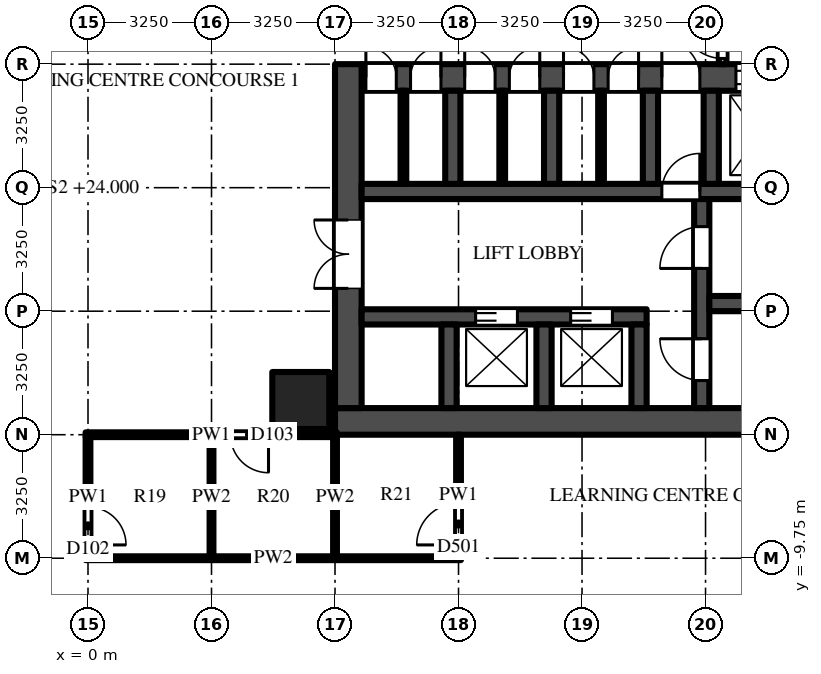
"""IFC4 building model, lengths in metres.
Left out: names, types, materials, properties, quantities, classifications, styles, units other than length and angle.
Written with IfcOpenShell. Run it as: python <this file> out.ifc"""

import sys

from ifc_helpers import new_model, si_unit, direction, frame, frame_2d, origin, origin_2d, place, context, subcontext, project, spatial, rectangle, extrude, source, transform, mapped, element, fill, save


model = new_model("IFC4")
c1 = context("Model", 3, precision=1e-05, world=origin(), true_north=direction((0.0, 1.0)))
c2 = subcontext(c1, "Body", "Model", "MODEL_VIEW")
j1 = project(units=[si_unit("LENGTHUNIT", "METRE"), si_unit("PLANEANGLEUNIT", "RADIAN")], contexts=[c1])
p1 = place(None, origin())
s1 = spatial("IfcSite", under=j1, at=p1, CompositionType="ELEMENT")
p2 = place(p1, origin())
s2 = spatial("IfcBuilding", under=s1, at=p2, CompositionType="ELEMENT")
p3 = place(p2, frame((0.0, 0.0, 24.0)))
s3 = spatial("IfcBuildingStorey", under=s2, at=p3, CompositionType="ELEMENT", Elevation=24.0)
m1 = source(origin(), c2, "Body", "SweptSolid", [
    extrude(rectangle(XDim=1.5, YDim=1.5, at=origin_2d()), origin(), (0.0, 0.0, 1.0), 5.0),
])
p4 = place(p3, frame((5.6, -5.6, 0.0), z_axis=(0.0, 0.0, 1.0), x_axis=(1.0, 0.0, 0.0)))
e1 = element("IfcColumn", 1, at=p4, inside=s3, PredefinedType="COLUMN", context=c2, shape_type="MappedRepresentation", body=[
    mapped(m1, transform((0.0, 0.0, 0.0))),
])
m2 = source(origin(), c2, "Body", "SweptSolid", [
    extrude(rectangle(XDim=16.25, YDim=0.7, at=frame_2d((8.125, 0.0))), origin(), (0.0, 0.0, 1.0), 4.7),
])
p5 = place(p3, frame((6.5, -6.15, 0.0), z_axis=(0.0, 0.0, 1.0), x_axis=(1.0, 0.0, 0.0)))
e2 = element("IfcWall", 2, at=p5, inside=s3, PredefinedType="SHEAR", context=c2, shape_type="MappedRepresentation", body=[
    mapped(m2, transform((0.0, 0.0, 0.0))),
])
m3 = source(origin(), c2, "Body", "SweptSolid", [
    extrude(rectangle(XDim=14.85, YDim=0.7, at=frame_2d((7.425, 0.0))), origin(), (0.0, 0.0, 1.0), 4.7),
])
p6 = place(p3, frame((7.2, 2.9, 0.0), z_axis=(0.0, 0.0, 1.0), x_axis=(1.0, 0.0, 0.0)))
e3 = element("IfcWall", 3, at=p6, inside=s3, PredefinedType="SHEAR", context=c2, shape_type="MappedRepresentation", body=[
    mapped(m3, transform((0.0, 0.0, 0.0))),
])
m4 = source(origin(), c2, "Body", "SweptSolid", [
    extrude(rectangle(XDim=1.3, YDim=2.1, at=frame_2d((0.65, 1.05))), frame((0.0, 0.36, 0.0), z_axis=(0.0, -1.0, 0.0), x_axis=(1.0, 0.0, 0.0)), (0.0, 0.0, 1.0), 0.72),
])
p7 = place(p6, frame((12.2, 0.0, 0.0)))
e4 = element("IfcOpeningElement", 4, at=p7, cuts=e3, PredefinedType="OPENING", context=c2, shape_type="MappedRepresentation", body=[
    mapped(m4, transform((0.0, 0.0, 0.0))),
])
m5 = source(origin(), c2, "Body", "SweptSolid", [
    extrude(rectangle(XDim=1.2, YDim=2.1, at=frame_2d((0.6, 1.05))), frame((0.0, 0.36, 0.0), z_axis=(0.0, -1.0, 0.0), x_axis=(1.0, 0.0, 0.0)), (0.0, 0.0, 1.0), 0.72),
])
p8 = place(p6, frame((9.85, 0.0, 0.0)))
e5 = element("IfcOpeningElement", 5, at=p8, cuts=e3, PredefinedType="OPENING", context=c2, shape_type="MappedRepresentation", body=[
    mapped(m5, transform((0.0, 0.0, 0.0))),
])
m6 = source(origin(), c2, "Body", "SweptSolid", [
    extrude(rectangle(XDim=1.0, YDim=2.1, at=frame_2d((0.5, 1.05))), frame((0.0, 0.36, 0.0), z_axis=(0.0, -1.0, 0.0), x_axis=(1.0, 0.0, 0.0)), (0.0, 0.0, 1.0), 0.72),
])
p9 = place(p6, frame((7.9, 0.0, 0.0)))
e6 = element("IfcOpeningElement", 6, at=p9, cuts=e3, PredefinedType="OPENING", context=c2, shape_type="MappedRepresentation", body=[
    mapped(m6, transform((0.0, 0.0, 0.0))),
])
m7 = source(origin(), c2, "Body", "SweptSolid", [
    extrude(rectangle(XDim=0.8, YDim=2.1, at=frame_2d((0.4, 1.05))), frame((0.0, 0.36, 0.0), z_axis=(0.0, -1.0, 0.0), x_axis=(1.0, 0.0, 0.0)), (0.0, 0.0, 1.0), 0.72),
])
p10 = place(p6, frame((0.113, 0.0, 0.0)))
e7 = element("IfcOpeningElement", 7, at=p10, cuts=e3, PredefinedType="OPENING", context=c2, shape_type="MappedRepresentation", body=[
    mapped(m7, transform((0.0, 0.0, 0.0))),
])
p11 = place(p6, frame((1.288, 0.0, 0.0)))
e8 = element("IfcOpeningElement", 8, at=p11, cuts=e3, PredefinedType="OPENING", context=c2, shape_type="MappedRepresentation", body=[
    mapped(m7, transform((0.0, 0.0, 0.0))),
])
p12 = place(p6, frame((2.712, 0.0, 0.0)))
e9 = element("IfcOpeningElement", 9, at=p12, cuts=e3, PredefinedType="OPENING", context=c2, shape_type="MappedRepresentation", body=[
    mapped(m7, transform((0.0, 0.0, 0.0))),
])
p13 = place(p6, frame((3.887, 0.0, 0.0)))
e10 = element("IfcOpeningElement", 10, at=p13, cuts=e3, PredefinedType="OPENING", context=c2, shape_type="MappedRepresentation", body=[
    mapped(m7, transform((0.0, 0.0, 0.0))),
])
p14 = place(p6, frame((5.312, 0.0, 0.0)))
e11 = element("IfcOpeningElement", 11, at=p14, cuts=e3, PredefinedType="OPENING", context=c2, shape_type="MappedRepresentation", body=[
    mapped(m7, transform((0.0, 0.0, 0.0))),
])
p15 = place(p6, frame((6.488, 0.0, 0.0)))
e12 = element("IfcOpeningElement", 12, at=p15, cuts=e3, PredefinedType="OPENING", context=c2, shape_type="MappedRepresentation", body=[
    mapped(m7, transform((0.0, 0.0, 0.0))),
])
m8 = source(origin(), c2, "Body", "SweptSolid", [
    extrude(rectangle(XDim=9.05, YDim=0.7, at=frame_2d((4.525, 0.0))), origin(), (0.0, 0.0, 1.0), 4.7),
])
p16 = place(p3, frame((6.85, -5.8, 0.0), z_axis=(0.0, 0.0, 1.0), x_axis=(0.0, 1.0, 0.0)))
e13 = element("IfcWall", 13, at=p16, inside=s3, PredefinedType="SHEAR", context=c2, shape_type="MappedRepresentation", body=[
    mapped(m8, transform((0.0, 0.0, 0.0))),
])
m9 = source(origin(), c2, "Body", "SweptSolid", [
    extrude(rectangle(XDim=1.8, YDim=2.1, at=frame_2d((0.9, 1.05))), frame((0.0, 0.36, 0.0), z_axis=(0.0, -1.0, 0.0), x_axis=(1.0, 0.0, 0.0)), (0.0, 0.0, 1.0), 0.72),
])
p17 = place(p16, frame((3.15, 0.0, 0.0)))
e14 = element("IfcOpeningElement", 14, at=p17, cuts=e13, PredefinedType="OPENING", context=c2, shape_type="MappedRepresentation", body=[
    mapped(m9, transform((0.0, 0.0, 0.0))),
])
m10 = source(origin(), c2, "Body", "SweptSolid", [
    extrude(rectangle(XDim=7.5, YDim=0.4, at=frame_2d((3.75, 0.0))), origin(), (0.0, 0.0, 1.0), 4.7),
])
p18 = place(p3, frame((7.2, -3.4, 0.0), z_axis=(0.0, 0.0, 1.0), x_axis=(1.0, 0.0, 0.0)))
e15 = element("IfcWall", 15, at=p18, inside=s3, PredefinedType="SHEAR", context=c2, shape_type="MappedRepresentation", body=[
    mapped(m10, transform((0.0, 0.0, 0.0))),
])
m11 = source(origin(), c2, "Body", "SweptSolid", [
    extrude(rectangle(XDim=1.1, YDim=2.1, at=frame_2d((0.55, 1.05))), frame((0.0, 0.21, 0.0), z_axis=(0.0, -1.0, 0.0), x_axis=(1.0, 0.0, 0.0)), (0.0, 0.0, 1.0), 0.42),
])
p19 = place(p18, frame((3.0, 0.0, 0.0)))
e16 = element("IfcOpeningElement", 16, at=p19, cuts=e15, PredefinedType="OPENING", context=c2, shape_type="MappedRepresentation", body=[
    mapped(m11, transform((0.0, 0.0, 0.0))),
])
p20 = place(p18, frame((5.5, 0.0, 0.0)))
e17 = element("IfcOpeningElement", 17, at=p20, cuts=e15, PredefinedType="OPENING", context=c2, shape_type="MappedRepresentation", body=[
    mapped(m11, transform((0.0, 0.0, 0.0))),
])
m12 = source(origin(), c2, "Body", "SweptSolid", [
    extrude(rectangle(XDim=14.85, YDim=0.4, at=frame_2d((7.425, 0.0))), origin(), (0.0, 0.0, 1.0), 4.7),
])
p21 = place(p3, frame((7.2, -0.1, 0.0), z_axis=(0.0, 0.0, 1.0), x_axis=(1.0, 0.0, 0.0)))
e18 = element("IfcWall", 18, at=p21, inside=s3, PredefinedType="SHEAR", context=c2, shape_type="MappedRepresentation", body=[
    mapped(m12, transform((0.0, 0.0, 0.0))),
])
m13 = source(origin(), c2, "Body", "SweptSolid", [
    extrude(rectangle(XDim=1.0, YDim=2.1, at=frame_2d((0.5, 1.05))), frame((0.0, 0.21, 0.0), z_axis=(0.0, -1.0, 0.0), x_axis=(1.0, 0.0, 0.0)), (0.0, 0.0, 1.0), 0.42),
])
p22 = place(p21, frame((7.9, 0.0, 0.0)))
e19 = element("IfcOpeningElement", 19, at=p22, cuts=e18, PredefinedType="OPENING", context=c2, shape_type="MappedRepresentation", body=[
    mapped(m13, transform((0.0, 0.0, 0.0))),
])
m14 = source(origin(), c2, "Body", "SweptSolid", [
    extrude(rectangle(XDim=5.5, YDim=0.4, at=frame_2d((2.75, 0.0))), origin(), (0.0, 0.0, 1.0), 4.7),
])
p23 = place(p3, frame((16.15, -5.8, 0.0), z_axis=(0.0, 0.0, 1.0), x_axis=(0.0, 1.0, 0.0)))
e20 = element("IfcWall", 20, at=p23, inside=s3, PredefinedType="SHEAR", context=c2, shape_type="MappedRepresentation", body=[
    mapped(m14, transform((0.0, 0.0, 0.0))),
])
p24 = place(p23, frame((0.725, 0.0, 0.0)))
e21 = element("IfcOpeningElement", 21, at=p24, cuts=e20, PredefinedType="OPENING", context=c2, shape_type="MappedRepresentation", body=[
    mapped(m11, transform((0.0, 0.0, 0.0))),
])
p25 = place(p23, frame((3.675, 0.0, 0.0)))
e22 = element("IfcOpeningElement", 22, at=p25, cuts=e20, PredefinedType="OPENING", context=c2, shape_type="MappedRepresentation", body=[
    mapped(m11, transform((0.0, 0.0, 0.0))),
])
m15 = source(origin(), c2, "Body", "SweptSolid", [
    extrude(rectangle(XDim=5.7, YDim=0.4, at=frame_2d((2.85, 0.0))), origin(), (0.0, 0.0, 1.0), 4.7),
])
p26 = place(p3, frame((16.35, -3.05, 0.0), z_axis=(0.0, 0.0, 1.0), x_axis=(1.0, 0.0, 0.0)))
e23 = element("IfcWall", 23, at=p26, inside=s3, PredefinedType="SHEAR", context=c2, shape_type="MappedRepresentation", body=[
    mapped(m15, transform((0.0, 0.0, 0.0))),
])
m16 = source(origin(), c2, "Body", "SweptSolid", [
    extrude(rectangle(XDim=2.2, YDim=0.4, at=frame_2d((1.1, 0.0))), origin(), (0.0, 0.0, 1.0), 4.7),
])
for number, where, z_axis, x_axis in (
    (24, (9.5, -5.8, 0.0), (0.0, 0.0, 1.0), (0.0, 1.0, 0.0)),
    (25, (12.0, -5.8, 0.0), (0.0, 0.0, 1.0), (0.0, 1.0, 0.0)),
    (26, (14.5, -5.8, 0.0), (0.0, 0.0, 1.0), (0.0, 1.0, 0.0)),
):
    element("IfcWall", number, at=place(p3, frame(where, z_axis=z_axis, x_axis=x_axis)), inside=s3, PredefinedType="SHEAR", context=c2, shape_type="MappedRepresentation", body=[
        mapped(m16, transform((0.0, 0.0, 0.0))),
    ])
m17 = source(origin(), c2, "Body", "SweptSolid", [
    extrude(rectangle(XDim=2.45, YDim=0.4, at=frame_2d((1.225, 0.0))), origin(), (0.0, 0.0, 1.0), 4.7),
])
for number, where, z_axis, x_axis in (
    (27, (9.6, 0.1, 0.0), (0.0, 0.0, 1.0), (0.0, 1.0, 0.0)),
    (28, (12.2, 0.1, 0.0), (0.0, 0.0, 1.0), (0.0, 1.0, 0.0)),
    (29, (14.8, 0.1, 0.0), (0.0, 0.0, 1.0), (0.0, 1.0, 0.0)),
    (30, (16.4, 0.1, 0.0), (0.0, 0.0, 1.0), (0.0, 1.0, 0.0)),
):
    element("IfcWall", number, at=place(p3, frame(where, z_axis=z_axis, x_axis=x_axis)), inside=s3, PredefinedType="SHEAR", context=c2, shape_type="MappedRepresentation", body=[
        mapped(m17, transform((0.0, 0.0, 0.0))),
    ])
m18 = source(origin(), c2, "Body", "SweptSolid", [
    extrude(rectangle(XDim=3.25, YDim=0.2, at=frame_2d((1.625, 0.0))), origin(), (0.0, 0.0, 1.0), 4.7),
])
p27 = place(p3, frame((16.7, 3.25, 0.0), z_axis=(0.0, 0.0, 1.0), x_axis=(0.0, 1.0, 0.0)))
e31 = element("IfcWall", 31, at=p27, inside=s3, PredefinedType="PARTITIONING", context=c2, shape_type="MappedRepresentation", body=[
    mapped(m18, transform((0.0, 0.0, 0.0))),
])
m19 = source(origin(), c2, "Body", "SweptSolid", [
    extrude(rectangle(XDim=1.1, YDim=2.1, at=frame_2d((0.55, 1.05))), frame((0.0, 0.11, 0.0), z_axis=(0.0, -1.0, 0.0), x_axis=(1.0, 0.0, 0.0)), (0.0, 0.0, 1.0), 0.22),
])
p28 = place(p27, frame((0.15, 0.0, 0.0)))
e32 = element("IfcOpeningElement", 32, at=p28, cuts=e31, PredefinedType="OPENING", context=c2, shape_type="MappedRepresentation", body=[
    mapped(m19, transform((0.0, 0.0, 0.0))),
])
m20 = source(origin(), c2, "Body", "SweptSolid", [
    extrude(rectangle(XDim=2.45, YDim=0.15, at=frame_2d((1.225, 0.0))), origin(), (0.0, 0.0, 1.0), 4.7),
])
for number, where, z_axis, x_axis in (
    (33, (8.3, 0.1, 0.0), (0.0, 0.0, 1.0), (0.0, 1.0, 0.0)),
    (34, (10.9, 0.1, 0.0), (0.0, 0.0, 1.0), (0.0, 1.0, 0.0)),
    (35, (13.5, 0.1, 0.0), (0.0, 0.0, 1.0), (0.0, 1.0, 0.0)),
):
    element("IfcWall", number, at=place(p3, frame(where, z_axis=z_axis, x_axis=x_axis)), inside=s3, PredefinedType="PARTITIONING", context=c2, shape_type="MappedRepresentation", body=[
        mapped(m20, transform((0.0, 0.0, 0.0))),
    ])
m21 = source(origin(), c2, "Body", "SweptSolid", [
    extrude(rectangle(XDim=3.137, YDim=0.125, at=frame_2d((1.569, 0.0))), origin(), (0.0, 0.0, 1.0), 4.077),
])
p29 = place(p3, frame((0.0, -6.562, 0.0), z_axis=(0.0, 0.0, 1.0), x_axis=(0.0, -1.0, 0.0)))
e36 = element("IfcWall", 36, at=p29, inside=s3, PredefinedType="PARTITIONING", context=c2, shape_type="MappedRepresentation", body=[
    mapped(m21, transform((0.0, 0.0, 0.0))),
])
m22 = source(origin(), c2, "Body", "SweptSolid", [
    extrude(rectangle(XDim=1.0, YDim=2.1, at=frame_2d((0.5, 1.05))), frame((0.0, 0.073, 0.0), z_axis=(0.0, -1.0, 0.0), x_axis=(1.0, 0.0, 0.0)), (0.0, 0.0, 1.0), 0.145),
])
p30 = place(p29, frame((1.837, 0.0, 0.0)))
e37 = element("IfcOpeningElement", 37, at=p30, cuts=e36, PredefinedType="OPENING", context=c2, shape_type="MappedRepresentation", body=[
    mapped(m22, transform((0.0, 0.0, 0.0))),
])
m23 = source(origin(), c2, "Body", "SweptSolid", [
    extrude(rectangle(XDim=3.137, YDim=0.1, at=frame_2d((1.569, 0.0))), origin(), (0.0, 0.0, 1.0), 4.7),
])
p31 = place(p3, frame((3.25, -9.7, 0.0), z_axis=(0.0, 0.0, 1.0), x_axis=(0.0, 1.0, 0.0)))
e38 = element("IfcWall", 38, at=p31, inside=s3, PredefinedType="PARTITIONING", context=c2, shape_type="MappedRepresentation", body=[
    mapped(m23, transform((0.0, 0.0, 0.0))),
])
m24 = source(origin(), c2, "Body", "SweptSolid", [
    extrude(rectangle(XDim=3.137, YDim=0.1, at=frame_2d((1.569, 0.0))), origin(), (0.0, 0.0, 1.0), 3.996),
])
p32 = place(p3, frame((6.5, -9.7, 0.0), z_axis=(0.0, 0.0, 1.0), x_axis=(0.0, 1.0, 0.0)))
e39 = element("IfcWall", 39, at=p32, inside=s3, PredefinedType="PARTITIONING", context=c2, shape_type="MappedRepresentation", body=[
    mapped(m24, transform((0.0, 0.0, 0.0))),
])
m25 = source(origin(), c2, "Body", "SweptSolid", [
    extrude(rectangle(XDim=3.2, YDim=0.125, at=frame_2d((1.6, 0.0))), origin(), (0.0, 0.0, 1.0), 3.996),
])
p33 = place(p3, frame((9.75, -9.7, 0.0), z_axis=(0.0, 0.0, 1.0), x_axis=(0.0, 1.0, 0.0)))
e40 = element("IfcWall", 40, at=p33, inside=s3, PredefinedType="PARTITIONING", context=c2, shape_type="MappedRepresentation", body=[
    mapped(m25, transform((0.0, 0.0, 0.0))),
])
m26 = source(origin(), c2, "Body", "SweptSolid", [
    extrude(rectangle(XDim=1.1, YDim=2.1, at=frame_2d((0.55, 1.05))), frame((0.0, 0.073, 0.0), z_axis=(0.0, -1.0, 0.0), x_axis=(1.0, 0.0, 0.0)), (0.0, 0.0, 1.0), 0.145),
])
p34 = place(p33, frame((0.3, 0.0, 0.0)))
e41 = element("IfcOpeningElement", 41, at=p34, cuts=e40, PredefinedType="OPENING", context=c2, shape_type="MappedRepresentation", body=[
    mapped(m26, transform((0.0, 0.0, 0.0))),
])
m27 = source(origin(), c2, "Body", "SweptSolid", [
    extrude(rectangle(XDim=9.875, YDim=0.1, at=frame_2d((4.938, 0.0))), origin(), (0.0, 0.0, 1.0), 3.762),
])
p35 = place(p3, frame((-0.062, -9.75, 0.0), z_axis=(0.0, 0.0, 1.0), x_axis=(1.0, 0.0, 0.0)))
e42 = element("IfcWall", 42, at=p35, inside=s3, PredefinedType="PARTITIONING", context=c2, shape_type="MappedRepresentation", body=[
    mapped(m27, transform((0.0, 0.0, 0.0))),
])
m28 = source(origin(), c2, "Body", "SweptSolid", [
    extrude(rectangle(XDim=6.613, YDim=0.125, at=frame_2d((3.306, 0.0))), origin(), (0.0, 0.0, 1.0), 3.762),
])
p36 = place(p3, frame((6.55, -6.5, 0.0), z_axis=(0.0, 0.0, 1.0), x_axis=(-1.0, 0.0, 0.0)))
e43 = element("IfcWall", 43, at=p36, inside=s3, PredefinedType="PARTITIONING", context=c2, shape_type="MappedRepresentation", body=[
    mapped(m28, transform((0.0, 0.0, 0.0))),
])
p37 = place(p36, frame((1.8, 0.0, 0.0)))
e44 = element("IfcOpeningElement", 44, at=p37, cuts=e43, PredefinedType="OPENING", context=c2, shape_type="MappedRepresentation", body=[
    mapped(m22, transform((0.0, 0.0, 0.0))),
])
m29 = source(origin(), c2, "Body", "SweptSolid", [
    extrude(rectangle(XDim=1.1, YDim=2.1, at=frame_2d((0.55, 1.05))), frame((0.0, 0.025, 0.0), z_axis=(0.0, -1.0, 0.0), x_axis=(1.0, 0.0, 0.0)), (0.0, 0.0, 1.0), 0.05),
])
p38 = place(p19, origin())
e45 = element("IfcDoor", 45, at=p38, inside=s3, OperationType="DOUBLE_DOOR_SLIDING", PredefinedType="DOOR", context=c2, shape_type="MappedRepresentation", body=[
    mapped(m29, transform((0.0, 0.0, 0.0))),
])
fill(e16, e45)
p39 = place(p20, origin())
e46 = element("IfcDoor", 46, at=p39, inside=s3, OperationType="DOUBLE_DOOR_SLIDING", PredefinedType="DOOR", context=c2, shape_type="MappedRepresentation", body=[
    mapped(m29, transform((0.0, 0.0, 0.0))),
])
fill(e17, e46)
m30 = source(origin(), c2, "Body", "SweptSolid", [
    extrude(rectangle(XDim=1.2, YDim=2.1, at=frame_2d((0.6, 1.05))), frame((0.0, -0.275, 0.0), z_axis=(0.0, -1.0, 0.0), x_axis=(1.0, 0.0, 0.0)), (0.0, 0.0, 1.0), 0.05),
])
p40 = place(p8, origin())
e47 = element("IfcDoor", 47, at=p40, inside=s3, OperationType="DOUBLE_DOOR_SLIDING", PredefinedType="DOOR", context=c2, shape_type="MappedRepresentation", body=[
    mapped(m30, transform((0.0, 0.0, 0.0))),
])
fill(e5, e47)
m31 = source(origin(), c2, "Body", "SweptSolid", [
    extrude(rectangle(XDim=1.8, YDim=2.1, at=frame_2d((0.9, 1.05))), frame((0.0, -0.275, 0.0), z_axis=(0.0, -1.0, 0.0), x_axis=(1.0, 0.0, 0.0)), (0.0, 0.0, 1.0), 0.05),
])
p41 = place(p17, origin())
e48 = element("IfcDoor", 48, at=p41, inside=s3, OperationType="DOUBLE_DOOR_SINGLE_SWING", PredefinedType="DOOR", context=c2, shape_type="MappedRepresentation", body=[
    mapped(m31, transform((0.0, 0.0, 0.0))),
])
fill(e14, e48)
p42 = place(p24, origin())
e49 = element("IfcDoor", 49, at=p42, inside=s3, OperationType="SINGLE_SWING_RIGHT", PredefinedType="DOOR", context=c2, shape_type="MappedRepresentation", body=[
    mapped(m29, transform((0.0, 0.0, 0.0))),
])
fill(e21, e49)
p43 = place(p25, origin())
e50 = element("IfcDoor", 50, at=p43, inside=s3, OperationType="SINGLE_SWING_LEFT", PredefinedType="DOOR", context=c2, shape_type="MappedRepresentation", body=[
    mapped(m29, transform((0.0, 0.0, 0.0))),
])
fill(e22, e50)
m32 = source(origin(), c2, "Body", "SweptSolid", [
    extrude(rectangle(XDim=1.0, YDim=2.1, at=frame_2d((0.5, 1.05))), frame((0.0, 0.025, 0.0), z_axis=(0.0, -1.0, 0.0), x_axis=(1.0, 0.0, 0.0)), (0.0, 0.0, 1.0), 0.05),
])
p44 = place(p22, origin())
e51 = element("IfcDoor", 51, at=p44, inside=s3, OperationType="SINGLE_SWING_RIGHT", PredefinedType="DOOR", context=c2, shape_type="MappedRepresentation", body=[
    mapped(m32, transform((0.0, 0.0, 0.0))),
])
fill(e19, e51)
m33 = source(origin(), c2, "Body", "SweptSolid", [
    extrude(rectangle(XDim=1.0, YDim=2.1, at=frame_2d((0.5, 1.05))), frame((0.0, -0.275, 0.0), z_axis=(0.0, -1.0, 0.0), x_axis=(1.0, 0.0, 0.0)), (0.0, 0.0, 1.0), 0.05),
])
p45 = place(p9, origin())
e52 = element("IfcDoor", 52, at=p45, inside=s3, OperationType="SINGLE_SWING_LEFT", PredefinedType="DOOR", context=c2, shape_type="MappedRepresentation", body=[
    mapped(m33, transform((0.0, 0.0, 0.0))),
])
fill(e6, e52)
p46 = place(p28, origin())
e53 = element("IfcDoor", 53, at=p46, inside=s3, OperationType="SINGLE_SWING_RIGHT", PredefinedType="DOOR", context=c2, shape_type="MappedRepresentation", body=[
    mapped(m29, transform((0.0, 0.0, 0.0))),
])
fill(e32, e53)
m34 = source(origin(), c2, "Body", "SweptSolid", [
    extrude(rectangle(XDim=0.8, YDim=2.1, at=frame_2d((0.4, 1.05))), frame((0.0, -0.275, 0.0), z_axis=(0.0, -1.0, 0.0), x_axis=(1.0, 0.0, 0.0)), (0.0, 0.0, 1.0), 0.05),
])
p47 = place(p10, origin())
e54 = element("IfcDoor", 54, at=p47, inside=s3, OperationType="SINGLE_SWING_LEFT", PredefinedType="DOOR", context=c2, shape_type="MappedRepresentation", body=[
    mapped(m34, transform((0.0, 0.0, 0.0))),
])
fill(e7, e54)
p48 = place(p11, origin())
e55 = element("IfcDoor", 55, at=p48, inside=s3, OperationType="SINGLE_SWING_RIGHT", PredefinedType="DOOR", context=c2, shape_type="MappedRepresentation", body=[
    mapped(m34, transform((0.0, 0.0, 0.0))),
])
fill(e8, e55)
p49 = place(p12, origin())
e56 = element("IfcDoor", 56, at=p49, inside=s3, OperationType="SINGLE_SWING_LEFT", PredefinedType="DOOR", context=c2, shape_type="MappedRepresentation", body=[
    mapped(m34, transform((0.0, 0.0, 0.0))),
])
fill(e9, e56)
p50 = place(p13, origin())
e57 = element("IfcDoor", 57, at=p50, inside=s3, OperationType="SINGLE_SWING_RIGHT", PredefinedType="DOOR", context=c2, shape_type="MappedRepresentation", body=[
    mapped(m34, transform((0.0, 0.0, 0.0))),
])
fill(e10, e57)
p51 = place(p14, origin())
e58 = element("IfcDoor", 58, at=p51, inside=s3, OperationType="SINGLE_SWING_LEFT", PredefinedType="DOOR", context=c2, shape_type="MappedRepresentation", body=[
    mapped(m34, transform((0.0, 0.0, 0.0))),
])
fill(e11, e58)
p52 = place(p15, origin())
e59 = element("IfcDoor", 59, at=p52, inside=s3, OperationType="SINGLE_SWING_RIGHT", PredefinedType="DOOR", context=c2, shape_type="MappedRepresentation", body=[
    mapped(m34, transform((0.0, 0.0, 0.0))),
])
fill(e12, e59)
p53 = place(p30, origin())
e60 = element("IfcDoor", 60, at=p53, inside=s3, OperationType="SINGLE_SWING_RIGHT", PredefinedType="DOOR", context=c2, shape_type="MappedRepresentation", body=[
    mapped(m32, transform((0.0, 0.0, 0.0))),
])
fill(e37, e60)
p54 = place(p34, origin())
e61 = element("IfcDoor", 61, at=p54, inside=s3, OperationType="SINGLE_SWING_LEFT", PredefinedType="DOOR", context=c2, shape_type="MappedRepresentation", body=[
    mapped(m29, transform((0.0, 0.0, 0.0))),
])
fill(e41, e61)
p55 = place(p37, origin())
e62 = element("IfcDoor", 62, at=p55, inside=s3, OperationType="SINGLE_SWING_LEFT", PredefinedType="DOOR", context=c2, shape_type="MappedRepresentation", body=[
    mapped(m32, transform((0.0, 0.0, 0.0))),
])
fill(e44, e62)
save(model, sys.argv[1])
